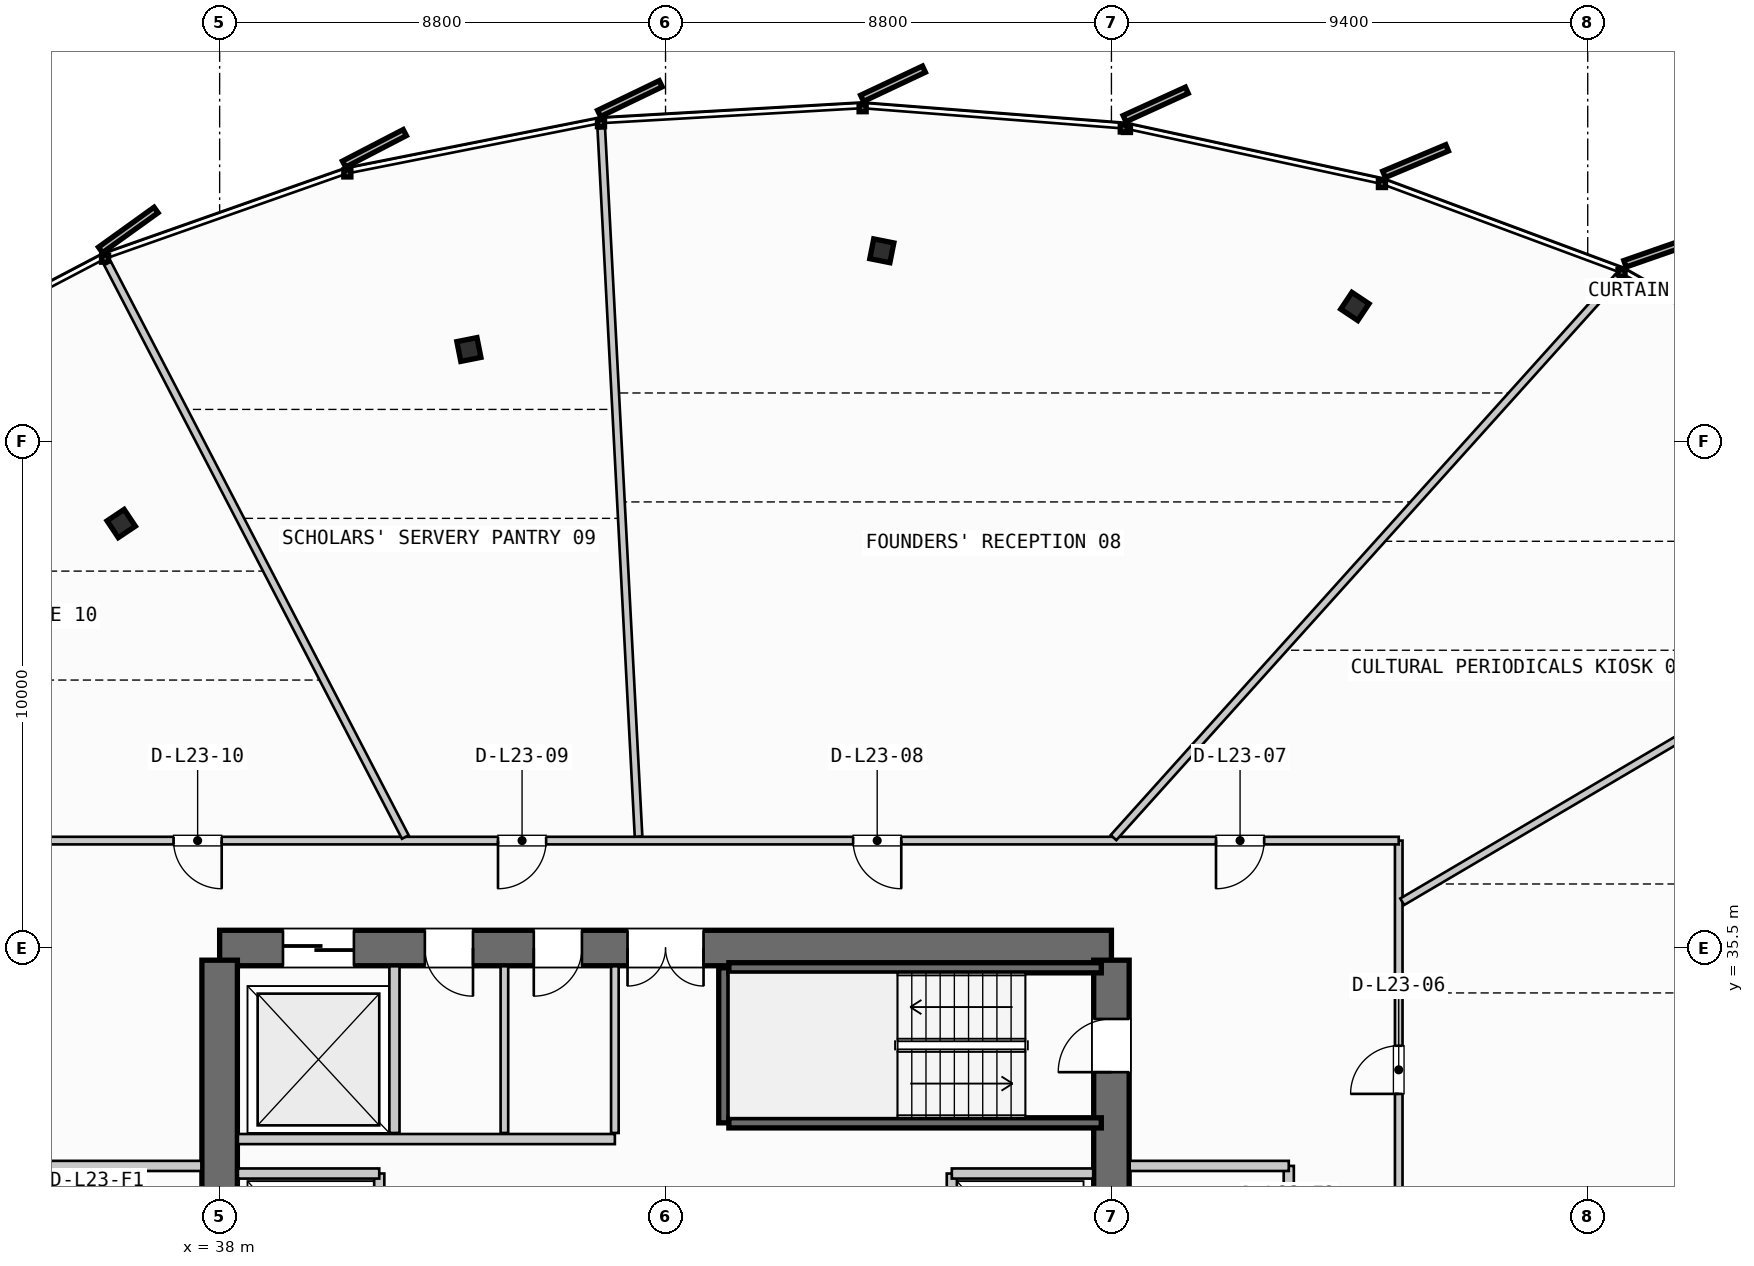
"""IFC4 building model, lengths in metres.
Left out: names, types, materials, properties, quantities, classifications, styles, units other than length and angle.
Written with IfcOpenShell. Run it as: python <this file> out.ifc"""

import sys

from ifc_helpers import new_model, si_unit, direction, frame, frame_2d, origin, origin_2d, place, context, subcontext, project, spatial, rectangle, i_section, extrude, source, transform, mapped, element, fill, save


model = new_model("IFC4")
c1 = context("Model", 3, precision=1e-05, world=origin(), true_north=direction((0.0, 1.0)))
c2 = subcontext(c1, "Body", "Model", "MODEL_VIEW")
j1 = project(units=[si_unit("LENGTHUNIT", "METRE"), si_unit("PLANEANGLEUNIT", "RADIAN")], contexts=[c1])
p1 = place(None, origin())
s1 = spatial("IfcSite", under=j1, at=p1, CompositionType="ELEMENT")
p2 = place(p1, origin())
s2 = spatial("IfcBuilding", under=s1, at=p2, CompositionType="ELEMENT")
p3 = place(p2, frame((0.0, 0.0, 96.4)))
s3 = spatial("IfcBuildingStorey", under=s2, at=p3, CompositionType="ELEMENT", Elevation=96.4)
p4 = place(p3, frame((55.6, 35.5, 0.0), z_axis=(0.0, 0.0, 1.0), x_axis=(-1.0, 0.0, 0.0)))
e1 = element("IfcWall", 1, at=p4, inside=s3, PredefinedType="SHEAR", context=c2, shape_type="SweptSolid", body=[
    extrude(rectangle(XDim=17.6, YDim=0.7, at=frame_2d((8.8, 0.0))), origin(), (0.0, 0.0, 1.0), 3.35),
])
p5 = place(p4, frame((8.05, 0.0, 0.0)))
e2 = element("IfcOpeningElement", 2, at=p5, cuts=e1, PredefinedType="OPENING", context=c2, shape_type="SweptSolid", body=[
    extrude(rectangle(XDim=1.5, YDim=2.2, at=frame_2d((0.75, 1.1))), frame((0.0, 0.36, 0.0), z_axis=(0.0, -1.0, 0.0), x_axis=(1.0, 0.0, 0.0)), (0.0, 0.0, 1.0), 0.72),
])
p6 = place(p4, frame((14.95, 0.0, 0.0)))
e3 = element("IfcOpeningElement", 3, at=p6, cuts=e1, PredefinedType="OPENING", context=c2, shape_type="SweptSolid", body=[
    extrude(rectangle(XDim=1.4, YDim=2.3, at=frame_2d((0.7, 1.15))), frame((0.0, 0.36, 0.0), z_axis=(0.0, -1.0, 0.0), x_axis=(1.0, 0.0, 0.0)), (0.0, 0.0, 1.0), 0.72),
])
p7 = place(p4, frame((12.6, 0.0, 0.0)))
e4 = element("IfcOpeningElement", 4, at=p7, cuts=e1, PredefinedType="OPENING", context=c2, shape_type="SweptSolid", body=[
    extrude(rectangle(XDim=0.95, YDim=2.15, at=frame_2d((0.475, 1.075))), frame((0.0, 0.36, 0.0), z_axis=(0.0, -1.0, 0.0), x_axis=(1.0, 0.0, 0.0)), (0.0, 0.0, 1.0), 0.72),
])
p8 = place(p4, frame((10.45, 0.0, 0.0)))
e5 = element("IfcOpeningElement", 5, at=p8, cuts=e1, PredefinedType="OPENING", context=c2, shape_type="SweptSolid", body=[
    extrude(rectangle(XDim=0.95, YDim=2.15, at=frame_2d((0.475, 1.075))), frame((0.0, 0.36, 0.0), z_axis=(0.0, -1.0, 0.0), x_axis=(1.0, 0.0, 0.0)), (0.0, 0.0, 1.0), 0.72),
])
p9 = place(p3, frame((38.0, 35.26, 0.0), z_axis=(0.0, 0.0, 1.0), x_axis=(0.0, -1.0, 0.0)))
e6 = element("IfcWall", 6, at=p9, inside=s3, PredefinedType="SHEAR", context=c2, shape_type="SweptSolid", body=[
    extrude(rectangle(XDim=14.92, YDim=0.7, at=frame_2d((7.46, 0.0))), origin(), (0.0, 0.0, 1.0), 3.35),
])
p10 = place(p9, frame((5.21, 0.0, 0.0)))
e7 = element("IfcOpeningElement", 7, at=p10, cuts=e6, PredefinedType="OPENING", context=c2, shape_type="SweptSolid", body=[
    extrude(rectangle(XDim=1.1, YDim=2.2, at=frame_2d((0.55, 1.1))), frame((0.0, 0.36, 0.0), z_axis=(0.0, -1.0, 0.0), x_axis=(1.0, 0.0, 0.0)), (0.0, 0.0, 1.0), 0.72),
])
p11 = place(p3, frame((55.6, 20.34, 0.0), z_axis=(0.0, 0.0, 1.0), x_axis=(0.0, 1.0, 0.0)))
e8 = element("IfcWall", 8, at=p11, inside=s3, PredefinedType="SHEAR", context=c2, shape_type="SweptSolid", body=[
    extrude(rectangle(XDim=14.92, YDim=0.7, at=frame_2d((7.46, 0.0))), origin(), (0.0, 0.0, 1.0), 3.35),
])
p12 = place(p11, frame((12.71, 0.0, 0.0)))
e9 = element("IfcOpeningElement", 9, at=p12, cuts=e8, PredefinedType="OPENING", context=c2, shape_type="SweptSolid", body=[
    extrude(rectangle(XDim=1.05, YDim=2.15, at=frame_2d((0.525, 1.075))), frame((0.0, 0.36, 0.0), z_axis=(0.0, -1.0, 0.0), x_axis=(1.0, 0.0, 0.0)), (0.0, 0.0, 1.0), 0.72),
])
p13 = place(p11, frame((8.61, 0.0, 0.0)))
e10 = element("IfcOpeningElement", 10, at=p13, cuts=e8, PredefinedType="OPENING", context=c2, shape_type="SweptSolid", body=[
    extrude(rectangle(XDim=1.1, YDim=2.2, at=frame_2d((0.55, 1.1))), frame((0.0, 0.36, 0.0), z_axis=(0.0, -1.0, 0.0), x_axis=(1.0, 0.0, 0.0)), (0.0, 0.0, 1.0), 0.72),
])
m1 = source(origin(), c2, "Body", "SweptSolid", [
    extrude(i_section(OverallWidth=0.405, OverallDepth=0.398, WebThickness=0.035, FlangeThickness=0.056, FilletRadius=0.015, at=origin_2d()), origin(), (0.0, 0.0, 1.0), 3.35),
])
for number, where, z_axis, x_axis in (
    (11, (60.405, 48.161, 0.0), (0.0, 0.0, 1.0), (0.556, 0.831, 0.0)),
    (12, (51.069, 49.259, 0.0), (0.0, 0.0, 1.0), (0.195, 0.981, 0.0)),
    (13, (42.919, 47.311, 0.0), (0.0, 0.0, 1.0), (-0.195, 0.981, 0.0)),
    (14, (36.058, 43.877, 0.0), (0.0, 0.0, 1.0), (-0.556, 0.831, 0.0)),
):
    element("IfcColumn", number, at=place(p3, frame(where, z_axis=z_axis, x_axis=x_axis)), inside=s3, PredefinedType="COLUMN", context=c2, shape_type="MappedRepresentation", body=[
        mapped(m1, transform((0.0, 0.0, 0.0), scale=1.0)),
    ])
p14 = place(p3, frame((47.95, 32.05, 0.0), z_axis=(0.0, 0.0, 1.0), x_axis=(0.0, 1.0, 0.0)))
e15 = element("IfcWall", 15, at=p14, inside=s3, PredefinedType="SHEAR", context=c2, shape_type="SweptSolid", body=[
    extrude(rectangle(XDim=3.06, YDim=0.2, at=frame_2d((1.53, 0.0))), origin(), (0.0, 0.0, 1.0), 3.35),
])
for number, where, z_axis, x_axis in (
    (16, (48.05, 35.11, 0.0), (0.0, 0.0, 1.0), (1.0, 0.0, 0.0)),
    (17, (55.4, 32.05, 0.0), (0.0, 0.0, 1.0), (-1.0, 0.0, 0.0)),
):
    element("IfcWall", number, at=place(p3, frame(where, z_axis=z_axis, x_axis=x_axis)), inside=s3, PredefinedType="SHEAR", context=c2, shape_type="SweptSolid", body=[
        extrude(rectangle(XDim=7.35, YDim=0.2, at=frame_2d((3.675, 0.0))), origin(), (0.0, 0.0, 1.0), 3.35),
    ])
p15 = place(p3, frame((41.15, 27.95, 0.0), z_axis=(0.0, 0.0, 1.0), x_axis=(0.0, 1.0, 0.0)))
e18 = element("IfcWall", 18, at=p15, inside=s3, PredefinedType="PARTITIONING", context=c2, shape_type="SweptSolid", body=[
    extrude(rectangle(XDim=3.1, YDim=0.2, at=frame_2d((1.55, 0.0))), origin(), (0.0, 0.0, 1.0), 2.28),
])
p16 = place(p3, frame((38.36, 31.05, 0.0), z_axis=(0.0, 0.0, 1.0), x_axis=(1.0, 0.0, 0.0)))
e19 = element("IfcWall", 19, at=p16, inside=s3, PredefinedType="PARTITIONING", context=c2, shape_type="SweptSolid", body=[
    extrude(rectangle(XDim=2.79, YDim=0.2, at=frame_2d((1.395, 0.0))), origin(), (0.0, 0.0, 1.0), 2.28),
])
p17 = place(p3, frame((34.5, 31.2, 0.0), z_axis=(0.0, 0.0, 1.0), x_axis=(1.0, 0.0, 0.0)))
e20 = element("IfcWall", 20, at=p17, inside=s3, PredefinedType="PARTITIONING", context=c2, shape_type="SweptSolid", body=[
    extrude(rectangle(XDim=3.14, YDim=0.2, at=frame_2d((1.57, 0.0))), origin(), (0.0, 0.0, 1.0), 2.28),
])
p18 = place(p3, frame((52.45, 27.95, 0.0), z_axis=(0.0, 0.0, 1.0), x_axis=(0.0, 1.0, 0.0)))
e21 = element("IfcWall", 21, at=p18, inside=s3, PredefinedType="PARTITIONING", context=c2, shape_type="SweptSolid", body=[
    extrude(rectangle(XDim=3.1, YDim=0.2, at=frame_2d((1.55, 0.0))), origin(), (0.0, 0.0, 1.0), 2.28),
])
p19 = place(p3, frame((52.45, 31.05, 0.0), z_axis=(0.0, 0.0, 1.0), x_axis=(1.0, 0.0, 0.0)))
e22 = element("IfcWall", 22, at=p19, inside=s3, PredefinedType="PARTITIONING", context=c2, shape_type="SweptSolid", body=[
    extrude(rectangle(XDim=2.79, YDim=0.2, at=frame_2d((1.395, 0.0))), origin(), (0.0, 0.0, 1.0), 2.28),
])
p20 = place(p3, frame((59.1, 26.8, 0.0), z_axis=(0.0, 0.0, 1.0), x_axis=(0.0, 1.0, 0.0)))
e23 = element("IfcWall", 23, at=p20, inside=s3, PredefinedType="PARTITIONING", context=c2, shape_type="SweptSolid", body=[
    extrude(rectangle(XDim=4.4, YDim=0.2, at=frame_2d((2.2, 0.0))), origin(), (0.0, 0.0, 1.0), 2.28),
])
p21 = place(p20, frame((1.65, 0.0, 0.0)))
e24 = element("IfcOpeningElement", 24, at=p21, cuts=e23, PredefinedType="OPENING", context=c2, shape_type="SweptSolid", body=[
    extrude(rectangle(XDim=1.05, YDim=2.15, at=frame_2d((0.525, 1.075))), frame((0.0, 0.11, 0.0), z_axis=(0.0, -1.0, 0.0), x_axis=(1.0, 0.0, 0.0)), (0.0, 0.0, 1.0), 0.22),
])
p22 = place(p3, frame((55.96, 31.2, 0.0), z_axis=(0.0, 0.0, 1.0), x_axis=(1.0, 0.0, 0.0)))
e25 = element("IfcWall", 25, at=p22, inside=s3, PredefinedType="PARTITIONING", context=c2, shape_type="SweptSolid", body=[
    extrude(rectangle(XDim=3.14, YDim=0.2, at=frame_2d((1.57, 0.0))), origin(), (0.0, 0.0, 1.0), 2.28),
])
p23 = place(p3, frame((41.45, 31.85, 0.0), z_axis=(0.0, 0.0, 1.0), x_axis=(0.0, 1.0, 0.0)))
e26 = element("IfcWall", 26, at=p23, inside=s3, PredefinedType="PARTITIONING", context=c2, shape_type="SweptSolid", body=[
    extrude(rectangle(XDim=3.29, YDim=0.2, at=frame_2d((1.645, 0.0))), origin(), (0.0, 0.0, 1.0), 2.28),
])
p24 = place(p3, frame((38.36, 31.73, 0.0), z_axis=(0.0, 0.0, 1.0), x_axis=(1.0, 0.0, 0.0)))
e27 = element("IfcWall", 27, at=p24, inside=s3, PredefinedType="PARTITIONING", context=c2, shape_type="SweptSolid", body=[
    extrude(rectangle(XDim=7.44, YDim=0.2, at=frame_2d((3.72, 0.0))), origin(), (0.0, 0.0, 1.0), 2.28),
])
p25 = place(p3, frame((45.8, 31.85, 0.0), z_axis=(0.0, 0.0, 1.0), x_axis=(0.0, 1.0, 0.0)))
e28 = element("IfcWall", 28, at=p25, inside=s3, PredefinedType="PARTITIONING", context=c2, shape_type="SweptSolid", body=[
    extrude(rectangle(XDim=3.29, YDim=0.15, at=frame_2d((1.645, 0.0))), origin(), (0.0, 0.0, 1.0), 2.28),
])
p26 = place(p3, frame((43.62, 31.85, 0.0), z_axis=(0.0, 0.0, 1.0), x_axis=(0.0, 1.0, 0.0)))
e29 = element("IfcWall", 29, at=p26, inside=s3, PredefinedType="PLUMBINGWALL", context=c2, shape_type="SweptSolid", body=[
    extrude(rectangle(XDim=3.29, YDim=0.15, at=frame_2d((1.645, 0.0))), origin(), (0.0, 0.0, 1.0), 2.28),
])
p27 = place(p3, frame((61.27, 17.14, 0.0), z_axis=(0.0, 0.0, 1.0), x_axis=(0.0, 1.0, 0.0)))
e30 = element("IfcWall", 30, at=p27, inside=s3, PredefinedType="PARTITIONING", context=c2, shape_type="SweptSolid", body=[
    extrude(rectangle(XDim=20.48, YDim=0.15, at=frame_2d((10.24, 0.0))), origin(), (0.0, 0.0, 1.0), 2.28),
])
p28 = place(p27, frame((4.084, 0.0, 0.0)))
e31 = element("IfcOpeningElement", 31, at=p28, cuts=e30, PredefinedType="OPENING", context=c2, shape_type="SweptSolid", body=[
    extrude(rectangle(XDim=0.95, YDim=2.15, at=frame_2d((0.475, 1.075))), frame((0.0, 0.085, 0.0), z_axis=(0.0, -1.0, 0.0), x_axis=(1.0, 0.0, 0.0)), (0.0, 0.0, 1.0), 0.17),
])
p29 = place(p27, frame((8.875, 0.0, 0.0)))
e32 = element("IfcOpeningElement", 32, at=p29, cuts=e30, PredefinedType="OPENING", context=c2, shape_type="SweptSolid", body=[
    extrude(rectangle(XDim=0.95, YDim=2.15, at=frame_2d((0.475, 1.075))), frame((0.0, 0.085, 0.0), z_axis=(0.0, -1.0, 0.0), x_axis=(1.0, 0.0, 0.0)), (0.0, 0.0, 1.0), 0.17),
])
p30 = place(p27, frame((15.482, 0.0, 0.0)))
e33 = element("IfcOpeningElement", 33, at=p30, cuts=e30, PredefinedType="OPENING", context=c2, shape_type="SweptSolid", body=[
    extrude(rectangle(XDim=0.95, YDim=2.15, at=frame_2d((0.475, 1.075))), frame((0.0, 0.085, 0.0), z_axis=(0.0, -1.0, 0.0), x_axis=(1.0, 0.0, 0.0)), (0.0, 0.0, 1.0), 0.17),
])
p31 = place(p3, frame((61.27, 37.62, 0.0), z_axis=(0.0, 0.0, 1.0), x_axis=(-1.0, 0.0, 0.0)))
e34 = element("IfcWall", 34, at=p31, inside=s3, PredefinedType="PARTITIONING", context=c2, shape_type="SweptSolid", body=[
    extrude(rectangle(XDim=28.42, YDim=0.15, at=frame_2d((14.21, 0.0))), origin(), (0.0, 0.0, 1.0), 2.28),
])
p32 = place(p31, frame((2.656, 0.0, 0.0)))
e35 = element("IfcOpeningElement", 35, at=p32, cuts=e34, PredefinedType="OPENING", context=c2, shape_type="SweptSolid", body=[
    extrude(rectangle(XDim=0.95, YDim=2.15, at=frame_2d((0.475, 1.075))), frame((0.0, 0.085, 0.0), z_axis=(0.0, -1.0, 0.0), x_axis=(1.0, 0.0, 0.0)), (0.0, 0.0, 1.0), 0.17),
])
p33 = place(p31, frame((9.818, 0.0, 0.0)))
e36 = element("IfcOpeningElement", 36, at=p33, cuts=e34, PredefinedType="OPENING", context=c2, shape_type="SweptSolid", body=[
    extrude(rectangle(XDim=0.95, YDim=2.15, at=frame_2d((0.475, 1.075))), frame((0.0, 0.085, 0.0), z_axis=(0.0, -1.0, 0.0), x_axis=(1.0, 0.0, 0.0)), (0.0, 0.0, 1.0), 0.17),
])
p34 = place(p31, frame((16.826, 0.0, 0.0)))
e37 = element("IfcOpeningElement", 37, at=p34, cuts=e34, PredefinedType="OPENING", context=c2, shape_type="SweptSolid", body=[
    extrude(rectangle(XDim=0.95, YDim=2.15, at=frame_2d((0.475, 1.075))), frame((0.0, 0.085, 0.0), z_axis=(0.0, -1.0, 0.0), x_axis=(1.0, 0.0, 0.0)), (0.0, 0.0, 1.0), 0.17),
])
p35 = place(p31, frame((23.229, 0.0, 0.0)))
e38 = element("IfcOpeningElement", 38, at=p35, cuts=e34, PredefinedType="OPENING", context=c2, shape_type="SweptSolid", body=[
    extrude(rectangle(XDim=0.95, YDim=2.15, at=frame_2d((0.475, 1.075))), frame((0.0, 0.085, 0.0), z_axis=(0.0, -1.0, 0.0), x_axis=(1.0, 0.0, 0.0)), (0.0, 0.0, 1.0), 0.17),
])
p36 = place(p3, frame((61.349, 29.785, 0.0), z_axis=(0.0, 0.0, 1.0), x_axis=(0.990815948539, 0.135217440153, 0.0)))
e39 = element("IfcWall", 39, at=p36, inside=s3, PredefinedType="PARTITIONING", context=c2, shape_type="SweptSolid", body=[
    extrude(rectangle(XDim=16.828, YDim=0.15, at=frame_2d((8.414, 0.0))), origin(), (0.0, 0.0, 1.0), 2.28),
])
p37 = place(p3, frame((61.339, 36.413, 0.0), z_axis=(0.0, 0.0, 1.0), x_axis=(0.861699562592, 0.507418824866, 0.0)))
e40 = element("IfcWall", 40, at=p37, inside=s3, PredefinedType="PARTITIONING", context=c2, shape_type="SweptSolid", body=[
    extrude(rectangle(XDim=13.833, YDim=0.15, at=frame_2d((6.917, 0.0))), origin(), (0.0, 0.0, 1.0), 2.28),
])
p38 = place(p3, frame((55.641, 37.679, 0.0), z_axis=(0.0, 0.0, 1.0), x_axis=(0.668923040801, 0.74333166587, 0.0)))
e41 = element("IfcWall", 41, at=p38, inside=s3, PredefinedType="PARTITIONING", context=c2, shape_type="SweptSolid", body=[
    extrude(rectangle(XDim=14.883, YDim=0.15, at=frame_2d((7.441, 0.0))), origin(), (0.0, 0.0, 1.0), 2.28),
])
p39 = place(p3, frame((46.268, 37.7, 0.0), z_axis=(0.0, 0.0, 1.0), x_axis=(-0.052586305446, 0.998616383042, 0.0)))
e42 = element("IfcWall", 42, at=p39, inside=s3, PredefinedType="PARTITIONING", context=c2, shape_type="SweptSolid", body=[
    extrude(rectangle(XDim=13.993, YDim=0.15, at=frame_2d((6.997, 0.0))), origin(), (0.0, 0.0, 1.0), 2.28),
])
p40 = place(p3, frame((41.665, 37.691, 0.0), z_axis=(0.0, 0.0, 1.0), x_axis=(-0.46076800873, 0.887520615046, 0.0)))
e43 = element("IfcWall", 43, at=p40, inside=s3, PredefinedType="PARTITIONING", context=c2, shape_type="SweptSolid", body=[
    extrude(rectangle(XDim=12.754, YDim=0.15, at=frame_2d((6.377, 0.0))), origin(), (0.0, 0.0, 1.0), 2.28),
])
m2 = source(origin(), c2, "Body", "SweptSolid", [
    extrude(rectangle(XDim=1.05, YDim=2.15, at=frame_2d((0.525, 1.075))), frame((0.0, 0.025, 0.0), z_axis=(0.0, -1.0, 0.0), x_axis=(1.0, 0.0, 0.0)), (0.0, 0.0, 1.0), 0.05),
])
p41 = place(p12, origin())
e44 = element("IfcDoor", 44, at=p41, inside=s3, OperationType="SINGLE_SWING_LEFT", PredefinedType="DOOR", context=c2, shape_type="MappedRepresentation", body=[
    mapped(m2, transform((0.0, 0.0, 0.0), scale=1.0)),
])
fill(e9, e44)
m3 = source(origin(), c2, "Body", "SweptSolid", [
    extrude(rectangle(XDim=1.5, YDim=2.2, at=frame_2d((0.75, 1.1))), frame((0.0, 0.025, 0.0), z_axis=(0.0, -1.0, 0.0), x_axis=(1.0, 0.0, 0.0)), (0.0, 0.0, 1.0), 0.05),
])
p42 = place(p5, origin())
e45 = element("IfcDoor", 45, at=p42, inside=s3, OperationType="DOUBLE_DOOR_SINGLE_SWING", PredefinedType="DOOR", context=c2, shape_type="MappedRepresentation", body=[
    mapped(m3, transform((0.0, 0.0, 0.0), scale=1.0)),
])
fill(e2, e45)
m4 = source(origin(), c2, "Body", "SweptSolid", [
    extrude(rectangle(XDim=1.4, YDim=2.3, at=frame_2d((0.7, 1.15))), frame((0.0, 0.025, 0.0), z_axis=(0.0, -1.0, 0.0), x_axis=(1.0, 0.0, 0.0)), (0.0, 0.0, 1.0), 0.05),
])
p43 = place(p6, origin())
e46 = element("IfcDoor", 46, at=p43, inside=s3, OperationType="SLIDING_TO_RIGHT", PredefinedType="DOOR", context=c2, shape_type="MappedRepresentation", body=[
    mapped(m4, transform((0.0, 0.0, 0.0), scale=1.0)),
])
fill(e3, e46)
m5 = source(origin(), c2, "Body", "SweptSolid", [
    extrude(rectangle(XDim=0.95, YDim=2.15, at=frame_2d((0.475, 1.075))), frame((0.0, 0.025, 0.0), z_axis=(0.0, -1.0, 0.0), x_axis=(1.0, 0.0, 0.0)), (0.0, 0.0, 1.0), 0.05),
])
p44 = place(p7, origin())
e47 = element("IfcDoor", 47, at=p44, inside=s3, OperationType="SINGLE_SWING_LEFT", PredefinedType="DOOR", context=c2, shape_type="MappedRepresentation", body=[
    mapped(m5, transform((0.0, 0.0, 0.0), scale=1.0)),
])
fill(e4, e47)
p45 = place(p8, origin())
e48 = element("IfcDoor", 48, at=p45, inside=s3, OperationType="SINGLE_SWING_RIGHT", PredefinedType="DOOR", context=c2, shape_type="MappedRepresentation", body=[
    mapped(m5, transform((0.0, 0.0, 0.0), scale=1.0)),
])
fill(e5, e48)
p46 = place(p30, origin())
e49 = element("IfcDoor", 49, at=p46, inside=s3, OperationType="SINGLE_SWING_LEFT", PredefinedType="DOOR", context=c2, shape_type="MappedRepresentation", body=[
    mapped(m5, transform((0.0, 0.0, 0.0), scale=1.0)),
])
fill(e33, e49)
p47 = place(p32, origin())
e50 = element("IfcDoor", 50, at=p47, inside=s3, OperationType="SINGLE_SWING_RIGHT", PredefinedType="DOOR", context=c2, shape_type="MappedRepresentation", body=[
    mapped(m5, transform((0.0, 0.0, 0.0), scale=1.0)),
])
fill(e35, e50)
p48 = place(p33, origin())
e51 = element("IfcDoor", 51, at=p48, inside=s3, OperationType="SINGLE_SWING_LEFT", PredefinedType="DOOR", context=c2, shape_type="MappedRepresentation", body=[
    mapped(m5, transform((0.0, 0.0, 0.0), scale=1.0)),
])
fill(e36, e51)
p49 = place(p34, origin())
e52 = element("IfcDoor", 52, at=p49, inside=s3, OperationType="SINGLE_SWING_RIGHT", PredefinedType="DOOR", context=c2, shape_type="MappedRepresentation", body=[
    mapped(m5, transform((0.0, 0.0, 0.0), scale=1.0)),
])
fill(e37, e52)
p50 = place(p35, origin())
e53 = element("IfcDoor", 53, at=p50, inside=s3, OperationType="SINGLE_SWING_LEFT", PredefinedType="DOOR", context=c2, shape_type="MappedRepresentation", body=[
    mapped(m5, transform((0.0, 0.0, 0.0), scale=1.0)),
])
fill(e38, e53)
save(model, sys.argv[1])
